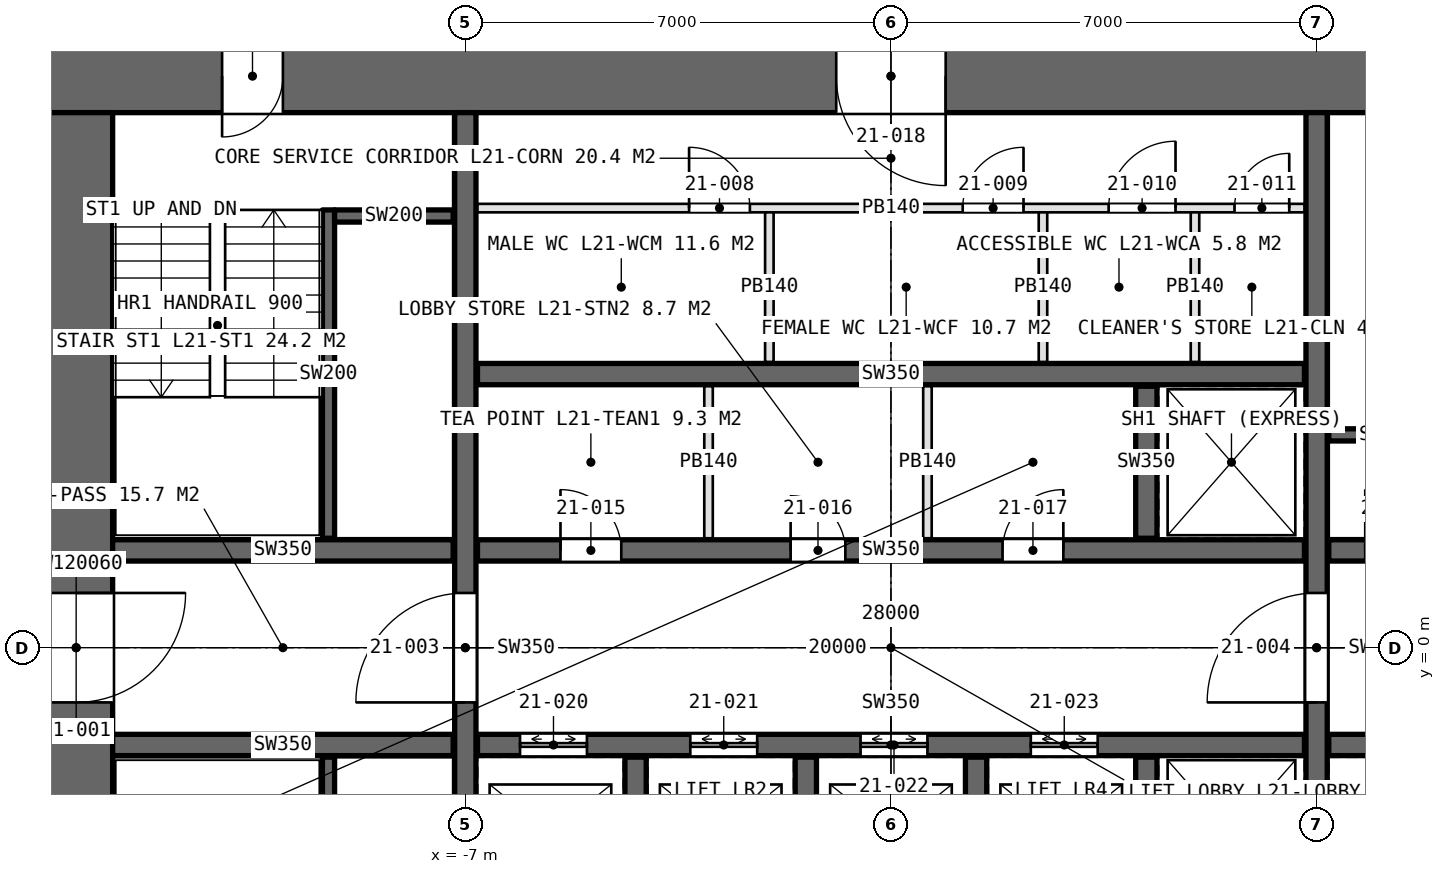
"""IFC4 building model, lengths in metres.
Left out: names, types, materials, properties, quantities, classifications, styles, units other than length and angle.
Written with IfcOpenShell. Run it as: python <this file> out.ifc"""

import sys

from ifc_helpers import new_model, si_unit, direction, frame, frame_2d, origin, place, context, subcontext, project, spatial, rectangle, extrude, element, fill, save


model = new_model("IFC4")
c1 = context("Model", 3, precision=1e-05, world=origin(), true_north=direction((0.0, 1.0)))
c2 = subcontext(c1, "Body", "Model", "MODEL_VIEW")
j1 = project(units=[si_unit("LENGTHUNIT", "METRE"), si_unit("PLANEANGLEUNIT", "RADIAN")], contexts=[c1])
p1 = place(None, origin())
s1 = spatial("IfcSite", under=j1, at=p1, CompositionType="ELEMENT")
p2 = place(p1, origin())
s2 = spatial("IfcBuilding", under=s1, at=p2, CompositionType="ELEMENT")
p3 = place(p2, frame((0.0, 0.0, 105.0)))
s3 = spatial("IfcBuildingStorey", under=s2, at=p3, CompositionType="ELEMENT", Elevation=105.0)
p4 = place(p3, frame((14.0, 9.4, 0.0), z_axis=(0.0, 0.0, 1.0), x_axis=(-1.0, 0.0, 0.0)))
e1 = element("IfcWall", 1, at=p4, inside=s3, PredefinedType="SHEAR", context=c2, shape_type="SweptSolid", body=[
    extrude(rectangle(XDim=28.0, YDim=1.2, at=frame_2d((14.0, 0.0))), origin(), (0.0, 0.0, 1.0), 4.2),
])
p5 = place(p4, frame((24.0, 0.0, 0.0)))
e2 = element("IfcOpeningElement", 2, at=p5, cuts=e1, PredefinedType="OPENING", context=c2, shape_type="SweptSolid", body=[
    extrude(rectangle(XDim=1.0, YDim=2.4, at=frame_2d((0.5, 1.2))), frame((0.0, 0.61, 0.0), z_axis=(0.0, -1.0, 0.0), x_axis=(1.0, 0.0, 0.0)), (0.0, 0.0, 1.0), 1.22),
])
p6 = place(p4, frame((13.1, 0.0, 0.0)))
e3 = element("IfcOpeningElement", 3, at=p6, cuts=e1, PredefinedType="OPENING", context=c2, shape_type="SweptSolid", body=[
    extrude(rectangle(XDim=1.8, YDim=2.4, at=frame_2d((0.9, 1.2))), frame((0.0, 0.61, 0.0), z_axis=(0.0, -1.0, 0.0), x_axis=(1.0, 0.0, 0.0)), (0.0, 0.0, 1.0), 1.22),
])
p7 = place(p3, frame((-13.4, 8.8, 0.0), z_axis=(0.0, 0.0, 1.0), x_axis=(0.0, -1.0, 0.0)))
e4 = element("IfcWall", 4, at=p7, inside=s3, PredefinedType="SHEAR", context=c2, shape_type="SweptSolid", body=[
    extrude(rectangle(XDim=17.6, YDim=1.2, at=frame_2d((8.8, 0.0))), origin(), (0.0, 0.0, 1.0), 4.2),
])
p8 = place(p7, frame((7.9, 0.0, 0.0)))
e5 = element("IfcOpeningElement", 5, at=p8, cuts=e4, PredefinedType="OPENING", context=c2, shape_type="SweptSolid", body=[
    extrude(rectangle(XDim=1.8, YDim=2.4, at=frame_2d((0.9, 1.2))), frame((0.0, 0.61, 0.0), z_axis=(0.0, -1.0, 0.0), x_axis=(1.0, 0.0, 0.0)), (0.0, 0.0, 1.0), 1.22),
])
p9 = place(p7, frame((16.5, 0.0, 0.0)))
e6 = element("IfcOpeningElement", 6, at=p9, cuts=e4, PredefinedType="OPENING", context=c2, shape_type="SweptSolid", body=[
    extrude(rectangle(XDim=1.0, YDim=2.4, at=frame_2d((0.5, 1.2))), frame((0.0, 0.61, 0.0), z_axis=(0.0, -1.0, 0.0), x_axis=(1.0, 0.0, 0.0)), (0.0, 0.0, 1.0), 1.22),
])
p10 = place(p3, frame((-7.0, -8.8, 0.0), z_axis=(0.0, 0.0, 1.0), x_axis=(0.0, 1.0, 0.0)))
e7 = element("IfcWall", 7, at=p10, inside=s3, PredefinedType="SHEAR", context=c2, shape_type="SweptSolid", body=[
    extrude(rectangle(XDim=17.6, YDim=0.35, at=frame_2d((8.8, 0.0))), origin(), (0.0, 0.0, 1.0), 4.2),
])
p11 = place(p10, frame((7.9, 0.0, 0.0)))
e8 = element("IfcOpeningElement", 8, at=p11, cuts=e7, PredefinedType="OPENING", context=c2, shape_type="SweptSolid", body=[
    extrude(rectangle(XDim=1.8, YDim=2.4, at=frame_2d((0.9, 1.2))), frame((0.0, 0.185, 0.0), z_axis=(0.0, -1.0, 0.0), x_axis=(1.0, 0.0, 0.0)), (0.0, 0.0, 1.0), 0.37),
])
p12 = place(p3, frame((7.0, -8.8, 0.0), z_axis=(0.0, 0.0, 1.0), x_axis=(0.0, 1.0, 0.0)))
e9 = element("IfcWall", 9, at=p12, inside=s3, PredefinedType="SHEAR", context=c2, shape_type="SweptSolid", body=[
    extrude(rectangle(XDim=17.6, YDim=0.35, at=frame_2d((8.8, 0.0))), origin(), (0.0, 0.0, 1.0), 4.2),
])
p13 = place(p12, frame((7.9, 0.0, 0.0)))
e10 = element("IfcOpeningElement", 10, at=p13, cuts=e9, PredefinedType="OPENING", context=c2, shape_type="SweptSolid", body=[
    extrude(rectangle(XDim=1.8, YDim=2.4, at=frame_2d((0.9, 1.2))), frame((0.0, 0.185, 0.0), z_axis=(0.0, -1.0, 0.0), x_axis=(1.0, 0.0, 0.0)), (0.0, 0.0, 1.0), 0.37),
])
p14 = place(p3, frame((-6.8, 1.6, 0.0), z_axis=(0.0, 0.0, 1.0), x_axis=(1.0, 0.0, 0.0)))
e11 = element("IfcWall", 11, at=p14, inside=s3, PredefinedType="SHEAR", context=c2, shape_type="SweptSolid", body=[
    extrude(rectangle(XDim=13.6, YDim=0.35, at=frame_2d((6.8, 0.0))), origin(), (0.0, 0.0, 1.0), 4.2),
])
p15 = place(p14, frame((1.365, 0.0, 0.0)))
e12 = element("IfcOpeningElement", 12, at=p15, cuts=e11, PredefinedType="OPENING", context=c2, shape_type="SweptSolid", body=[
    extrude(rectangle(XDim=1.0, YDim=2.4, at=frame_2d((0.5, 1.2))), frame((0.0, 0.185, 0.0), z_axis=(0.0, -1.0, 0.0), x_axis=(1.0, 0.0, 0.0)), (0.0, 0.0, 1.0), 0.37),
])
p16 = place(p14, frame((5.15, 0.0, 0.0)))
e13 = element("IfcOpeningElement", 13, at=p16, cuts=e11, PredefinedType="OPENING", context=c2, shape_type="SweptSolid", body=[
    extrude(rectangle(XDim=0.9, YDim=2.4, at=frame_2d((0.45, 1.2))), frame((0.0, 0.185, 0.0), z_axis=(0.0, -1.0, 0.0), x_axis=(1.0, 0.0, 0.0)), (0.0, 0.0, 1.0), 0.37),
])
p17 = place(p14, frame((8.635, 0.0, 0.0)))
e14 = element("IfcOpeningElement", 14, at=p17, cuts=e11, PredefinedType="OPENING", context=c2, shape_type="SweptSolid", body=[
    extrude(rectangle(XDim=1.0, YDim=2.4, at=frame_2d((0.5, 1.2))), frame((0.0, 0.185, 0.0), z_axis=(0.0, -1.0, 0.0), x_axis=(1.0, 0.0, 0.0)), (0.0, 0.0, 1.0), 0.37),
])
p18 = place(p3, frame((-6.8, -1.6, 0.0), z_axis=(0.0, 0.0, 1.0), x_axis=(1.0, 0.0, 0.0)))
e15 = element("IfcWall", 15, at=p18, inside=s3, PredefinedType="SHEAR", context=c2, shape_type="SweptSolid", body=[
    extrude(rectangle(XDim=13.6, YDim=0.35, at=frame_2d((6.8, 0.0))), origin(), (0.0, 0.0, 1.0), 4.2),
])
p19 = place(p18, frame((0.7, 0.0, 0.0)))
e16 = element("IfcOpeningElement", 16, at=p19, cuts=e15, PredefinedType="OPENING", context=c2, shape_type="SweptSolid", body=[
    extrude(rectangle(XDim=1.1, YDim=2.4, at=frame_2d((0.55, 1.2))), frame((0.0, 0.185, 0.0), z_axis=(0.0, -1.0, 0.0), x_axis=(1.0, 0.0, 0.0)), (0.0, 0.0, 1.0), 0.37),
])
p20 = place(p18, frame((3.5, 0.0, 0.0)))
e17 = element("IfcOpeningElement", 17, at=p20, cuts=e15, PredefinedType="OPENING", context=c2, shape_type="SweptSolid", body=[
    extrude(rectangle(XDim=1.1, YDim=2.4, at=frame_2d((0.55, 1.2))), frame((0.0, 0.185, 0.0), z_axis=(0.0, -1.0, 0.0), x_axis=(1.0, 0.0, 0.0)), (0.0, 0.0, 1.0), 0.37),
])
p21 = place(p18, frame((6.3, 0.0, 0.0)))
e18 = element("IfcOpeningElement", 18, at=p21, cuts=e15, PredefinedType="OPENING", context=c2, shape_type="SweptSolid", body=[
    extrude(rectangle(XDim=1.1, YDim=2.4, at=frame_2d((0.55, 1.2))), frame((0.0, 0.185, 0.0), z_axis=(0.0, -1.0, 0.0), x_axis=(1.0, 0.0, 0.0)), (0.0, 0.0, 1.0), 0.37),
])
p22 = place(p18, frame((9.1, 0.0, 0.0)))
e19 = element("IfcOpeningElement", 19, at=p22, cuts=e15, PredefinedType="OPENING", context=c2, shape_type="SweptSolid", body=[
    extrude(rectangle(XDim=1.1, YDim=2.4, at=frame_2d((0.55, 1.2))), frame((0.0, 0.185, 0.0), z_axis=(0.0, -1.0, 0.0), x_axis=(1.0, 0.0, 0.0)), (0.0, 0.0, 1.0), 0.37),
])
p23 = place(p3, frame((-6.8, 4.5, 0.0), z_axis=(0.0, 0.0, 1.0), x_axis=(1.0, 0.0, 0.0)))
e20 = element("IfcWall", 20, at=p23, inside=s3, PredefinedType="SHEAR", context=c2, shape_type="SweptSolid", body=[
    extrude(rectangle(XDim=13.6, YDim=0.35, at=frame_2d((6.8, 0.0))), origin(), (0.0, 0.0, 1.0), 4.2),
])
for number, where, z_axis, x_axis in (
    (21, (-12.8, 1.6, 0.0), (0.0, 0.0, 1.0), (1.0, 0.0, 0.0)),
    (22, (-12.8, -1.6, 0.0), (0.0, 0.0, 1.0), (1.0, 0.0, 0.0)),
):
    element("IfcWall", number, at=place(p3, frame(where, z_axis=z_axis, x_axis=x_axis)), inside=s3, PredefinedType="SHEAR", context=c2, shape_type="SweptSolid", body=[
        extrude(rectangle(XDim=5.6, YDim=0.35, at=frame_2d((2.8, 0.0))), origin(), (0.0, 0.0, 1.0), 4.2),
    ])
p24 = place(p3, frame((7.2, 1.6, 0.0), z_axis=(0.0, 0.0, 1.0), x_axis=(1.0, 0.0, 0.0)))
e23 = element("IfcWall", 23, at=p24, inside=s3, PredefinedType="SHEAR", context=c2, shape_type="SweptSolid", body=[
    extrude(rectangle(XDim=5.6, YDim=0.35, at=frame_2d((2.8, 0.0))), origin(), (0.0, 0.0, 1.0), 4.2),
])
p25 = place(p24, frame((0.6, 0.0, 0.0)))
e24 = element("IfcOpeningElement", 24, at=p25, cuts=e23, PredefinedType="OPENING", context=c2, shape_type="SweptSolid", body=[
    extrude(rectangle(XDim=1.0, YDim=2.4, at=frame_2d((0.5, 1.2))), frame((0.0, 0.185, 0.0), z_axis=(0.0, -1.0, 0.0), x_axis=(1.0, 0.0, 0.0)), (0.0, 0.0, 1.0), 0.37),
])
p26 = place(p3, frame((7.2, -1.6, 0.0), z_axis=(0.0, 0.0, 1.0), x_axis=(1.0, 0.0, 0.0)))
e25 = element("IfcWall", 25, at=p26, inside=s3, PredefinedType="SHEAR", context=c2, shape_type="SweptSolid", body=[
    extrude(rectangle(XDim=5.6, YDim=0.35, at=frame_2d((2.8, 0.0))), origin(), (0.0, 0.0, 1.0), 4.2),
])
p27 = place(p26, frame((0.9, 0.0, 0.0)))
e26 = element("IfcOpeningElement", 26, at=p27, cuts=e25, PredefinedType="OPENING", context=c2, shape_type="SweptSolid", body=[
    extrude(rectangle(XDim=1.3, YDim=2.4, at=frame_2d((0.65, 1.2))), frame((0.0, 0.185, 0.0), z_axis=(0.0, -1.0, 0.0), x_axis=(1.0, 0.0, 0.0)), (0.0, 0.0, 1.0), 0.37),
])
p28 = place(p26, frame((3.9, 0.0, 0.0)))
e27 = element("IfcOpeningElement", 27, at=p28, cuts=e25, PredefinedType="OPENING", context=c2, shape_type="SweptSolid", body=[
    extrude(rectangle(XDim=1.3, YDim=2.4, at=frame_2d((0.65, 1.2))), frame((0.0, 0.185, 0.0), z_axis=(0.0, -1.0, 0.0), x_axis=(1.0, 0.0, 0.0)), (0.0, 0.0, 1.0), 0.37),
])
for number, where, z_axis, x_axis in (
    (28, (-4.2, -4.3, 0.0), (0.0, 0.0, 1.0), (0.0, 1.0, 0.0)),
    (29, (-1.4, -4.3, 0.0), (0.0, 0.0, 1.0), (0.0, 1.0, 0.0)),
    (30, (1.4, -4.3, 0.0), (0.0, 0.0, 1.0), (0.0, 1.0, 0.0)),
    (31, (4.2, 1.8, 0.0), (0.0, 0.0, 1.0), (0.0, 1.0, 0.0)),
    (32, (4.2, -4.3, 0.0), (0.0, 0.0, 1.0), (0.0, 1.0, 0.0)),
):
    element("IfcWall", number, at=place(p3, frame(where, z_axis=z_axis, x_axis=x_axis)), inside=s3, PredefinedType="SHEAR", context=c2, shape_type="SweptSolid", body=[
        extrude(rectangle(XDim=2.5, YDim=0.35, at=frame_2d((1.25, 0.0))), origin(), (0.0, 0.0, 1.0), 4.2),
    ])
p29 = place(p3, frame((-6.8, 7.23, 0.0), z_axis=(0.0, 0.0, 1.0), x_axis=(1.0, 0.0, 0.0)))
e33 = element("IfcWall", 33, at=p29, inside=s3, PredefinedType="PARTITIONING", context=c2, shape_type="SweptSolid", body=[
    extrude(rectangle(XDim=13.6, YDim=0.14, at=frame_2d((6.8, 0.0))), origin(), (0.0, 0.0, 1.0), 3.95),
])
p30 = place(p29, frame((3.48, 0.0, 0.0)))
e34 = element("IfcOpeningElement", 34, at=p30, cuts=e33, PredefinedType="OPENING", context=c2, shape_type="SweptSolid", body=[
    extrude(rectangle(XDim=1.0, YDim=2.4, at=frame_2d((0.5, 1.2))), frame((0.0, 0.08, 0.0), z_axis=(0.0, -1.0, 0.0), x_axis=(1.0, 0.0, 0.0)), (0.0, 0.0, 1.0), 0.16),
])
p31 = place(p29, frame((7.98, 0.0, 0.0)))
e35 = element("IfcOpeningElement", 35, at=p31, cuts=e33, PredefinedType="OPENING", context=c2, shape_type="SweptSolid", body=[
    extrude(rectangle(XDim=1.0, YDim=2.4, at=frame_2d((0.5, 1.2))), frame((0.0, 0.08, 0.0), z_axis=(0.0, -1.0, 0.0), x_axis=(1.0, 0.0, 0.0)), (0.0, 0.0, 1.0), 0.16),
])
p32 = place(p29, frame((10.38, 0.0, 0.0)))
e36 = element("IfcOpeningElement", 36, at=p32, cuts=e33, PredefinedType="OPENING", context=c2, shape_type="SweptSolid", body=[
    extrude(rectangle(XDim=1.1, YDim=2.4, at=frame_2d((0.55, 1.2))), frame((0.0, 0.08, 0.0), z_axis=(0.0, -1.0, 0.0), x_axis=(1.0, 0.0, 0.0)), (0.0, 0.0, 1.0), 0.16),
])
p33 = place(p29, frame((12.45, 0.0, 0.0)))
e37 = element("IfcOpeningElement", 37, at=p33, cuts=e33, PredefinedType="OPENING", context=c2, shape_type="SweptSolid", body=[
    extrude(rectangle(XDim=0.9, YDim=2.4, at=frame_2d((0.45, 1.2))), frame((0.0, 0.08, 0.0), z_axis=(0.0, -1.0, 0.0), x_axis=(1.0, 0.0, 0.0)), (0.0, 0.0, 1.0), 0.16),
])
for number, where, z_axis, x_axis in (
    (38, (-2.0, 4.7, 0.0), (0.0, 0.0, 1.0), (0.0, 1.0, 0.0)),
    (39, (2.5, 4.7, 0.0), (0.0, 0.0, 1.0), (0.0, 1.0, 0.0)),
    (40, (5.0, 4.7, 0.0), (0.0, 0.0, 1.0), (0.0, 1.0, 0.0)),
):
    element("IfcWall", number, at=place(p3, frame(where, z_axis=z_axis, x_axis=x_axis)), inside=s3, PredefinedType="PARTITIONING", context=c2, shape_type="SweptSolid", body=[
        extrude(rectangle(XDim=2.46, YDim=0.14, at=frame_2d((1.23, 0.0))), origin(), (0.0, 0.0, 1.0), 3.95),
    ])
for number, where, z_axis, x_axis in (
    (41, (-3.0, 1.8, 0.0), (0.0, 0.0, 1.0), (0.0, 1.0, 0.0)),
    (42, (0.6, 1.8, 0.0), (0.0, 0.0, 1.0), (0.0, 1.0, 0.0)),
):
    element("IfcWall", number, at=place(p3, frame(where, z_axis=z_axis, x_axis=x_axis)), inside=s3, PredefinedType="PARTITIONING", context=c2, shape_type="SweptSolid", body=[
        extrude(rectangle(XDim=2.5, YDim=0.14, at=frame_2d((1.25, 0.0))), origin(), (0.0, 0.0, 1.0), 3.95),
    ])
p34 = place(p3, frame((-9.25, 7.2, 0.0), z_axis=(0.0, 0.0, 1.0), x_axis=(0.0, -1.0, 0.0)))
e43 = element("IfcWall", 43, at=p34, inside=s3, PredefinedType="SOLIDWALL", context=c2, shape_type="SweptSolid", body=[
    extrude(rectangle(XDim=5.4, YDim=0.2, at=frame_2d((2.7, 0.0))), origin(), (0.0, 0.0, 1.0), 4.2),
])
p35 = place(p3, frame((-9.15, 7.1, 0.0), z_axis=(0.0, 0.0, 1.0), x_axis=(1.0, 0.0, 0.0)))
e44 = element("IfcWall", 44, at=p35, inside=s3, PredefinedType="SOLIDWALL", context=c2, shape_type="SweptSolid", body=[
    extrude(rectangle(XDim=1.95, YDim=0.2, at=frame_2d((0.975, 0.0))), origin(), (0.0, 0.0, 1.0), 4.2),
])
p36 = place(p3, frame((-9.25, -7.2, 0.0), z_axis=(0.0, 0.0, 1.0), x_axis=(0.0, 1.0, 0.0)))
e45 = element("IfcWall", 45, at=p36, inside=s3, PredefinedType="SOLIDWALL", context=c2, shape_type="SweptSolid", body=[
    extrude(rectangle(XDim=5.4, YDim=0.2, at=frame_2d((2.7, 0.0))), origin(), (0.0, 0.0, 1.0), 4.2),
])
p37 = place(p3, frame((9.15, 3.5, 0.0), z_axis=(0.0, 0.0, 1.0), x_axis=(-1.0, 0.0, 0.0)))
e46 = element("IfcWall", 46, at=p37, inside=s3, PredefinedType="SOLIDWALL", context=c2, shape_type="SweptSolid", body=[
    extrude(rectangle(XDim=1.95, YDim=0.2, at=frame_2d((0.975, 0.0))), origin(), (0.0, 0.0, 1.0), 4.2),
])
p38 = place(p8, origin())
e47 = element("IfcDoor", 47, at=p38, inside=s3, OperationType="DOUBLE_DOOR_SINGLE_SWING", PredefinedType="DOOR", context=c2, shape_type="SweptSolid", body=[
    extrude(rectangle(XDim=1.8, YDim=2.4, at=frame_2d((0.9, 1.2))), frame((0.0, 0.025, 0.0), z_axis=(0.0, -1.0, 0.0), x_axis=(1.0, 0.0, 0.0)), (0.0, 0.0, 1.0), 0.05),
])
fill(e5, e47)
p39 = place(p11, origin())
e48 = element("IfcDoor", 48, at=p39, inside=s3, OperationType="DOUBLE_DOOR_SINGLE_SWING", PredefinedType="DOOR", context=c2, shape_type="SweptSolid", body=[
    extrude(rectangle(XDim=1.8, YDim=2.4, at=frame_2d((0.9, 1.2))), frame((0.0, 0.025, 0.0), z_axis=(0.0, -1.0, 0.0), x_axis=(1.0, 0.0, 0.0)), (0.0, 0.0, 1.0), 0.05),
])
fill(e8, e48)
p40 = place(p13, origin())
e49 = element("IfcDoor", 49, at=p40, inside=s3, OperationType="DOUBLE_DOOR_SINGLE_SWING", PredefinedType="DOOR", context=c2, shape_type="SweptSolid", body=[
    extrude(rectangle(XDim=1.8, YDim=2.4, at=frame_2d((0.9, 1.2))), frame((0.0, 0.025, 0.0), z_axis=(0.0, -1.0, 0.0), x_axis=(1.0, 0.0, 0.0)), (0.0, 0.0, 1.0), 0.05),
])
fill(e10, e49)
p41 = place(p5, origin())
e50 = element("IfcDoor", 50, at=p41, inside=s3, OperationType="SINGLE_SWING_RIGHT", PredefinedType="DOOR", context=c2, shape_type="SweptSolid", body=[
    extrude(rectangle(XDim=1.0, YDim=2.4, at=frame_2d((0.5, 1.2))), frame((0.0, 0.025, 0.0), z_axis=(0.0, -1.0, 0.0), x_axis=(1.0, 0.0, 0.0)), (0.0, 0.0, 1.0), 0.05),
])
fill(e2, e50)
p42 = place(p30, origin())
e51 = element("IfcDoor", 51, at=p42, inside=s3, OperationType="SINGLE_SWING_LEFT", PredefinedType="DOOR", context=c2, shape_type="SweptSolid", body=[
    extrude(rectangle(XDim=1.0, YDim=2.4, at=frame_2d((0.5, 1.2))), frame((0.0, 0.025, 0.0), z_axis=(0.0, -1.0, 0.0), x_axis=(1.0, 0.0, 0.0)), (0.0, 0.0, 1.0), 0.05),
])
fill(e34, e51)
p43 = place(p31, origin())
e52 = element("IfcDoor", 52, at=p43, inside=s3, OperationType="SINGLE_SWING_RIGHT", PredefinedType="DOOR", context=c2, shape_type="SweptSolid", body=[
    extrude(rectangle(XDim=1.0, YDim=2.4, at=frame_2d((0.5, 1.2))), frame((0.0, 0.025, 0.0), z_axis=(0.0, -1.0, 0.0), x_axis=(1.0, 0.0, 0.0)), (0.0, 0.0, 1.0), 0.05),
])
fill(e35, e52)
p44 = place(p32, origin())
e53 = element("IfcDoor", 53, at=p44, inside=s3, OperationType="SINGLE_SWING_RIGHT", PredefinedType="DOOR", context=c2, shape_type="SweptSolid", body=[
    extrude(rectangle(XDim=1.1, YDim=2.4, at=frame_2d((0.55, 1.2))), frame((0.0, 0.025, 0.0), z_axis=(0.0, -1.0, 0.0), x_axis=(1.0, 0.0, 0.0)), (0.0, 0.0, 1.0), 0.05),
])
fill(e36, e53)
p45 = place(p33, origin())
e54 = element("IfcDoor", 54, at=p45, inside=s3, OperationType="SINGLE_SWING_RIGHT", PredefinedType="DOOR", context=c2, shape_type="SweptSolid", body=[
    extrude(rectangle(XDim=0.9, YDim=2.4, at=frame_2d((0.45, 1.2))), frame((0.0, 0.025, 0.0), z_axis=(0.0, -1.0, 0.0), x_axis=(1.0, 0.0, 0.0)), (0.0, 0.0, 1.0), 0.05),
])
fill(e37, e54)
p46 = place(p15, origin())
e55 = element("IfcDoor", 55, at=p46, inside=s3, OperationType="SINGLE_SWING_LEFT", PredefinedType="DOOR", context=c2, shape_type="SweptSolid", body=[
    extrude(rectangle(XDim=1.0, YDim=2.4, at=frame_2d((0.5, 1.2))), frame((0.0, 0.025, 0.0), z_axis=(0.0, -1.0, 0.0), x_axis=(1.0, 0.0, 0.0)), (0.0, 0.0, 1.0), 0.05),
])
fill(e12, e55)
p47 = place(p16, origin())
e56 = element("IfcDoor", 56, at=p47, inside=s3, OperationType="SINGLE_SWING_LEFT", PredefinedType="DOOR", context=c2, shape_type="SweptSolid", body=[
    extrude(rectangle(XDim=0.9, YDim=2.4, at=frame_2d((0.45, 1.2))), frame((0.0, 0.025, 0.0), z_axis=(0.0, -1.0, 0.0), x_axis=(1.0, 0.0, 0.0)), (0.0, 0.0, 1.0), 0.05),
])
fill(e13, e56)
p48 = place(p17, origin())
e57 = element("IfcDoor", 57, at=p48, inside=s3, OperationType="SINGLE_SWING_RIGHT", PredefinedType="DOOR", context=c2, shape_type="SweptSolid", body=[
    extrude(rectangle(XDim=1.0, YDim=2.4, at=frame_2d((0.5, 1.2))), frame((0.0, 0.025, 0.0), z_axis=(0.0, -1.0, 0.0), x_axis=(1.0, 0.0, 0.0)), (0.0, 0.0, 1.0), 0.05),
])
fill(e14, e57)
p49 = place(p6, origin())
e58 = element("IfcDoor", 58, at=p49, inside=s3, OperationType="DOUBLE_DOOR_SINGLE_SWING", PredefinedType="DOOR", context=c2, shape_type="SweptSolid", body=[
    extrude(rectangle(XDim=1.8, YDim=2.4, at=frame_2d((0.9, 1.2))), frame((0.0, 0.025, 0.0), z_axis=(0.0, -1.0, 0.0), x_axis=(1.0, 0.0, 0.0)), (0.0, 0.0, 1.0), 0.05),
])
fill(e3, e58)
p50 = place(p19, origin())
e59 = element("IfcDoor", 59, at=p50, inside=s3, OperationType="DOUBLE_DOOR_SLIDING", PredefinedType="DOOR", context=c2, shape_type="SweptSolid", body=[
    extrude(rectangle(XDim=1.1, YDim=2.4, at=frame_2d((0.55, 1.2))), frame((0.0, 0.025, 0.0), z_axis=(0.0, -1.0, 0.0), x_axis=(1.0, 0.0, 0.0)), (0.0, 0.0, 1.0), 0.05),
])
fill(e16, e59)
p51 = place(p20, origin())
e60 = element("IfcDoor", 60, at=p51, inside=s3, OperationType="DOUBLE_DOOR_SLIDING", PredefinedType="DOOR", context=c2, shape_type="SweptSolid", body=[
    extrude(rectangle(XDim=1.1, YDim=2.4, at=frame_2d((0.55, 1.2))), frame((0.0, 0.025, 0.0), z_axis=(0.0, -1.0, 0.0), x_axis=(1.0, 0.0, 0.0)), (0.0, 0.0, 1.0), 0.05),
])
fill(e17, e60)
p52 = place(p21, origin())
e61 = element("IfcDoor", 61, at=p52, inside=s3, OperationType="DOUBLE_DOOR_SLIDING", PredefinedType="DOOR", context=c2, shape_type="SweptSolid", body=[
    extrude(rectangle(XDim=1.1, YDim=2.4, at=frame_2d((0.55, 1.2))), frame((0.0, 0.025, 0.0), z_axis=(0.0, -1.0, 0.0), x_axis=(1.0, 0.0, 0.0)), (0.0, 0.0, 1.0), 0.05),
])
fill(e18, e61)
p53 = place(p22, origin())
e62 = element("IfcDoor", 62, at=p53, inside=s3, OperationType="DOUBLE_DOOR_SLIDING", PredefinedType="DOOR", context=c2, shape_type="SweptSolid", body=[
    extrude(rectangle(XDim=1.1, YDim=2.4, at=frame_2d((0.55, 1.2))), frame((0.0, 0.025, 0.0), z_axis=(0.0, -1.0, 0.0), x_axis=(1.0, 0.0, 0.0)), (0.0, 0.0, 1.0), 0.05),
])
fill(e19, e62)
save(model, sys.argv[1])
